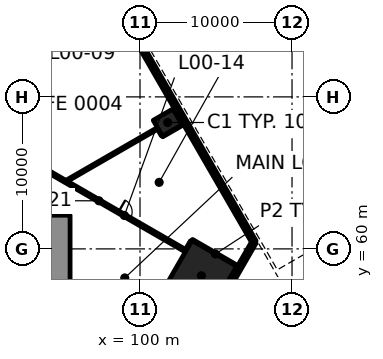
"""IFC4 building model, lengths in metres.
Left out: names, types, materials, properties, quantities, classifications, styles, units other than length and angle.
Written with IfcOpenShell. Run it as: python <this file> out.ifc"""

import sys

from ifc_helpers import new_model, si_unit, direction, frame, frame_2d, origin, origin_2d, place, context, subcontext, project, spatial, rectangle, extrude, element, fill, save


model = new_model("IFC4")
c1 = context("Model", 3, precision=1e-05, world=origin(), true_north=direction((0.0, 1.0)))
c2 = subcontext(c1, "Body", "Model", "MODEL_VIEW")
j1 = project(units=[si_unit("LENGTHUNIT", "METRE"), si_unit("PLANEANGLEUNIT", "RADIAN")], contexts=[c1])
p1 = place(None, origin())
s1 = spatial("IfcSite", under=j1, at=p1, CompositionType="ELEMENT")
p2 = place(p1, origin())
s2 = spatial("IfcBuilding", under=s1, at=p2, CompositionType="ELEMENT")
p3 = place(p2, origin())
s3 = spatial("IfcBuildingStorey", under=s2, at=p3, CompositionType="ELEMENT", Elevation=0.0)
p4 = place(p3, frame((94.2, 54.215, -0.3), z_axis=(0.0, 0.0, 1.0), x_axis=(0.0, 1.0, 0.0)))
e1 = element("IfcWall", 1, at=p4, inside=s3, PredefinedType="SHEAR", context=c2, shape_type="SweptSolid", body=[
    extrude(rectangle(XDim=8.0, YDim=2.4, at=frame_2d((4.0, 0.0))), origin(), (0.0, 0.0, 1.0), 8.3),
])
p5 = place(p3, frame((104.041, 58.233, 0.0), z_axis=(0.0, 0.0, 1.0), x_axis=(0.5, 0.866025403784, 0.0)))
e2 = element("IfcColumn", 2, at=p5, inside=s3, PredefinedType="COLUMN", context=c2, shape_type="SweptSolid", body=[
    extrude(rectangle(XDim=3.4, YDim=3.4, at=origin_2d()), origin(), (0.0, 0.0, 1.0), 8.0),
])
p6 = place(p3, frame((101.821, 68.315, 0.0), z_axis=(0.0, 0.0, 1.0), x_axis=(-0.5, 0.866025403784, 0.0)))
e3 = element("IfcColumn", 3, at=p6, inside=s3, PredefinedType="COLUMN", context=c2, shape_type="SweptSolid", body=[
    extrude(rectangle(XDim=1.2, YDim=1.5, at=origin_2d()), origin(), (0.0, 0.0, 1.0), 8.0),
])
p7 = place(p3, frame((101.471, 67.42, 0.0), z_axis=(0.0, 0.0, 1.0), x_axis=(0.866026058841, 0.499998865407, 0.0)))
e4 = element("IfcWall", 4, at=p7, inside=s3, PredefinedType="PARTITIONING", context=c2, shape_type="SweptSolid", body=[
    extrude(rectangle(XDim=1.708, YDim=0.1, at=frame_2d((0.854, 0.0))), origin(), (0.0, 0.0, 1.0), 7.1),
])
p8 = place(p3, frame((95.201, 64.493, 0.0), z_axis=(0.0, 0.0, 1.0), x_axis=(0.866031059472, 0.499990203933, 0.0)))
e5 = element("IfcWall", 5, at=p8, inside=s3, PredefinedType="PARTITIONING", context=c2, shape_type="SweptSolid", body=[
    extrude(rectangle(XDim=6.893, YDim=0.1, at=frame_2d((3.447, 0.0))), origin(), (0.0, 0.0, 1.0), 7.1),
])
p9 = place(p3, frame((103.062, 59.936, 0.0), z_axis=(0.0, 0.0, 1.0), x_axis=(0.500118698802, 0.865956862152, 0.0)))
e6 = element("IfcWall", 6, at=p9, inside=s3, PredefinedType="PARTITIONING", context=c2, shape_type="SweptSolid", body=[
    extrude(rectangle(XDim=0.64, YDim=0.15, at=frame_2d((0.32, 0.0))), origin(), (0.0, 0.0, 1.0), 7.1),
])
p10 = place(p3, frame((101.446, 67.464, 0.0), z_axis=(0.0, 0.0, 1.0), x_axis=(-0.500033033937, 0.866006330792, 0.0)))
e7 = element("IfcWall", 7, at=p10, inside=s3, PredefinedType="PARTITIONING", context=c2, shape_type="SweptSolid", body=[
    extrude(rectangle(XDim=0.499, YDim=0.1, at=frame_2d((0.25, 0.0))), origin(), (0.0, 0.0, 1.0), 7.1),
])
p11 = place(p3, frame((106.5, 58.776, 0.0), z_axis=(0.0, 0.0, 1.0), x_axis=(-0.866017611601, 0.500013496215, 0.0)))
e8 = element("IfcWall", 8, at=p11, inside=s3, PredefinedType="PARTITIONING", context=c2, shape_type="SweptSolid", body=[
    extrude(rectangle(XDim=3.558, YDim=0.15, at=frame_2d((1.779, 0.0))), origin(), (0.0, 0.0, 1.0), 7.1),
])
p12 = place(p3, frame((91.575, 66.47, 0.0), z_axis=(0.0, 0.0, 1.0), x_axis=(0.866027754727, -0.499995928025, 0.0)))
e9 = element("IfcWall", 9, at=p12, inside=s3, PredefinedType="PARTITIONING", context=c2, shape_type="SweptSolid", body=[
    extrude(rectangle(XDim=13.214, YDim=0.15, at=frame_2d((6.607, 0.0))), origin(), (0.0, 0.0, 1.0), 7.1),
])
p13 = place(p12, frame((8.091, 0.0, 0.0)))
e10 = element("IfcOpeningElement", 10, at=p13, cuts=e9, PredefinedType="OPENING", context=c2, shape_type="SweptSolid", body=[
    extrude(rectangle(XDim=0.9, YDim=2.1, at=frame_2d((0.45, 1.05))), frame((0.0, 0.085, 0.0), z_axis=(0.0, -1.0, 0.0), x_axis=(1.0, 0.0, 0.0)), (0.0, 0.0, 1.0), 0.17),
])
p14 = place(p3, frame((103.852, 54.125, 0.0), z_axis=(0.0, 0.0, 1.0), x_axis=(0.500000231294, 0.866025270247, 0.0)))
e11 = element("IfcWall", 11, at=p14, inside=s3, PredefinedType="SOLIDWALL", context=c2, shape_type="SweptSolid", body=[
    extrude(rectangle(XDim=7.304, YDim=0.3, at=frame_2d((3.652, 0.0))), origin(), (0.0, 0.0, 1.0), 7.7),
])
p15 = place(p14, frame((0.496, 0.0, 0.0)))
e12 = element("IfcOpeningElement", 12, at=p15, cuts=e11, PredefinedType="OPENING", context=c2, shape_type="SweptSolid", body=[
    extrude(rectangle(XDim=1.2, YDim=2.4, at=frame_2d((0.6, 1.2))), frame((0.0, 0.16, 0.0), z_axis=(0.0, -1.0, 0.0), x_axis=(1.0, 0.0, 0.0)), (0.0, 0.0, 1.0), 0.32),
])
p16 = place(p14, frame((3.852, 0.0, 0.15)))
e13 = element("IfcOpeningElement", 13, at=p16, cuts=e11, PredefinedType="OPENING", context=c2, shape_type="SweptSolid", body=[
    extrude(rectangle(XDim=2.1, YDim=5.4, at=frame_2d((1.05, 2.7))), frame((0.0, 0.16, 0.0), z_axis=(0.0, -1.0, 0.0), x_axis=(1.0, 0.0, 0.0)), (0.0, 0.0, 1.0), 0.32),
])
p17 = place(p3, frame((107.504, 60.451, 0.0), z_axis=(0.0, 0.0, 1.0), x_axis=(-0.500000550228, 0.86602508611, 0.0)))
e14 = element("IfcWall", 14, at=p17, inside=s3, PredefinedType="SOLIDWALL", context=c2, shape_type="SweptSolid", body=[
    extrude(rectangle(XDim=57.704, YDim=0.3, at=frame_2d((28.852, 0.0))), origin(), (0.0, 0.0, 1.0), 7.7),
])
p18 = place(p17, frame((56.104, 0.0, 0.0)))
e15 = element("IfcOpeningElement", 15, at=p18, cuts=e14, PredefinedType="OPENING", context=c2, shape_type="SweptSolid", body=[
    extrude(rectangle(XDim=1.2, YDim=2.4, at=frame_2d((0.6, 1.2))), frame((0.0, 0.16, 0.0), z_axis=(0.0, -1.0, 0.0), x_axis=(1.0, 0.0, 0.0)), (0.0, 0.0, 1.0), 0.32),
])
p19 = place(p17, frame((1.552, 0.0, 0.15)))
e16 = element("IfcOpeningElement", 16, at=p19, cuts=e14, PredefinedType="OPENING", context=c2, shape_type="SweptSolid", body=[
    extrude(rectangle(XDim=2.1, YDim=5.4, at=frame_2d((1.05, 2.7))), frame((0.0, 0.16, 0.0), z_axis=(0.0, -1.0, 0.0), x_axis=(1.0, 0.0, 0.0)), (0.0, 0.0, 1.0), 0.32),
])
p20 = place(p17, frame((4.052, 0.0, 0.15)))
e17 = element("IfcOpeningElement", 17, at=p20, cuts=e14, PredefinedType="OPENING", context=c2, shape_type="SweptSolid", body=[
    extrude(rectangle(XDim=2.1, YDim=5.4, at=frame_2d((1.05, 2.7))), frame((0.0, 0.16, 0.0), z_axis=(0.0, -1.0, 0.0), x_axis=(1.0, 0.0, 0.0)), (0.0, 0.0, 1.0), 0.32),
])
p21 = place(p17, frame((6.552, 0.0, 0.15)))
e18 = element("IfcOpeningElement", 18, at=p21, cuts=e14, PredefinedType="OPENING", context=c2, shape_type="SweptSolid", body=[
    extrude(rectangle(XDim=2.1, YDim=5.4, at=frame_2d((1.05, 2.7))), frame((0.0, 0.16, 0.0), z_axis=(0.0, -1.0, 0.0), x_axis=(1.0, 0.0, 0.0)), (0.0, 0.0, 1.0), 0.32),
])
p22 = place(p17, frame((9.052, 0.0, 0.15)))
e19 = element("IfcOpeningElement", 19, at=p22, cuts=e14, PredefinedType="OPENING", context=c2, shape_type="SweptSolid", body=[
    extrude(rectangle(XDim=2.1, YDim=5.4, at=frame_2d((1.05, 2.7))), frame((0.0, 0.16, 0.0), z_axis=(0.0, -1.0, 0.0), x_axis=(1.0, 0.0, 0.0)), (0.0, 0.0, 1.0), 0.32),
])
p23 = place(p17, frame((11.552, 0.0, 0.15)))
e20 = element("IfcOpeningElement", 20, at=p23, cuts=e14, PredefinedType="OPENING", context=c2, shape_type="SweptSolid", body=[
    extrude(rectangle(XDim=2.1, YDim=5.4, at=frame_2d((1.05, 2.7))), frame((0.0, 0.16, 0.0), z_axis=(0.0, -1.0, 0.0), x_axis=(1.0, 0.0, 0.0)), (0.0, 0.0, 1.0), 0.32),
])
p24 = place(p17, frame((14.052, 0.0, 0.15)))
e21 = element("IfcOpeningElement", 21, at=p24, cuts=e14, PredefinedType="OPENING", context=c2, shape_type="SweptSolid", body=[
    extrude(rectangle(XDim=2.1, YDim=5.4, at=frame_2d((1.05, 2.7))), frame((0.0, 0.16, 0.0), z_axis=(0.0, -1.0, 0.0), x_axis=(1.0, 0.0, 0.0)), (0.0, 0.0, 1.0), 0.32),
])
p25 = place(p17, frame((16.552, 0.0, 0.15)))
e22 = element("IfcOpeningElement", 22, at=p25, cuts=e14, PredefinedType="OPENING", context=c2, shape_type="SweptSolid", body=[
    extrude(rectangle(XDim=2.1, YDim=5.4, at=frame_2d((1.05, 2.7))), frame((0.0, 0.16, 0.0), z_axis=(0.0, -1.0, 0.0), x_axis=(1.0, 0.0, 0.0)), (0.0, 0.0, 1.0), 0.32),
])
p26 = place(p17, frame((19.052, 0.0, 0.15)))
e23 = element("IfcOpeningElement", 23, at=p26, cuts=e14, PredefinedType="OPENING", context=c2, shape_type="SweptSolid", body=[
    extrude(rectangle(XDim=2.1, YDim=5.4, at=frame_2d((1.05, 2.7))), frame((0.0, 0.16, 0.0), z_axis=(0.0, -1.0, 0.0), x_axis=(1.0, 0.0, 0.0)), (0.0, 0.0, 1.0), 0.32),
])
p27 = place(p17, frame((21.552, 0.0, 0.15)))
e24 = element("IfcOpeningElement", 24, at=p27, cuts=e14, PredefinedType="OPENING", context=c2, shape_type="SweptSolid", body=[
    extrude(rectangle(XDim=2.1, YDim=5.4, at=frame_2d((1.05, 2.7))), frame((0.0, 0.16, 0.0), z_axis=(0.0, -1.0, 0.0), x_axis=(1.0, 0.0, 0.0)), (0.0, 0.0, 1.0), 0.32),
])
p28 = place(p17, frame((24.052, 0.0, 0.15)))
e25 = element("IfcOpeningElement", 25, at=p28, cuts=e14, PredefinedType="OPENING", context=c2, shape_type="SweptSolid", body=[
    extrude(rectangle(XDim=2.1, YDim=5.4, at=frame_2d((1.05, 2.7))), frame((0.0, 0.16, 0.0), z_axis=(0.0, -1.0, 0.0), x_axis=(1.0, 0.0, 0.0)), (0.0, 0.0, 1.0), 0.32),
])
p29 = place(p17, frame((26.552, 0.0, 0.15)))
e26 = element("IfcOpeningElement", 26, at=p29, cuts=e14, PredefinedType="OPENING", context=c2, shape_type="SweptSolid", body=[
    extrude(rectangle(XDim=2.1, YDim=5.4, at=frame_2d((1.05, 2.7))), frame((0.0, 0.16, 0.0), z_axis=(0.0, -1.0, 0.0), x_axis=(1.0, 0.0, 0.0)), (0.0, 0.0, 1.0), 0.32),
])
p30 = place(p17, frame((29.052, 0.0, 0.15)))
e27 = element("IfcOpeningElement", 27, at=p30, cuts=e14, PredefinedType="OPENING", context=c2, shape_type="SweptSolid", body=[
    extrude(rectangle(XDim=2.1, YDim=5.4, at=frame_2d((1.05, 2.7))), frame((0.0, 0.16, 0.0), z_axis=(0.0, -1.0, 0.0), x_axis=(1.0, 0.0, 0.0)), (0.0, 0.0, 1.0), 0.32),
])
p31 = place(p17, frame((31.552, 0.0, 0.15)))
e28 = element("IfcOpeningElement", 28, at=p31, cuts=e14, PredefinedType="OPENING", context=c2, shape_type="SweptSolid", body=[
    extrude(rectangle(XDim=2.1, YDim=5.4, at=frame_2d((1.05, 2.7))), frame((0.0, 0.16, 0.0), z_axis=(0.0, -1.0, 0.0), x_axis=(1.0, 0.0, 0.0)), (0.0, 0.0, 1.0), 0.32),
])
p32 = place(p17, frame((34.052, 0.0, 0.15)))
e29 = element("IfcOpeningElement", 29, at=p32, cuts=e14, PredefinedType="OPENING", context=c2, shape_type="SweptSolid", body=[
    extrude(rectangle(XDim=2.1, YDim=5.4, at=frame_2d((1.05, 2.7))), frame((0.0, 0.16, 0.0), z_axis=(0.0, -1.0, 0.0), x_axis=(1.0, 0.0, 0.0)), (0.0, 0.0, 1.0), 0.32),
])
p33 = place(p17, frame((36.552, 0.0, 0.15)))
e30 = element("IfcOpeningElement", 30, at=p33, cuts=e14, PredefinedType="OPENING", context=c2, shape_type="SweptSolid", body=[
    extrude(rectangle(XDim=2.1, YDim=5.4, at=frame_2d((1.05, 2.7))), frame((0.0, 0.16, 0.0), z_axis=(0.0, -1.0, 0.0), x_axis=(1.0, 0.0, 0.0)), (0.0, 0.0, 1.0), 0.32),
])
p34 = place(p17, frame((39.052, 0.0, 0.15)))
e31 = element("IfcOpeningElement", 31, at=p34, cuts=e14, PredefinedType="OPENING", context=c2, shape_type="SweptSolid", body=[
    extrude(rectangle(XDim=2.1, YDim=5.4, at=frame_2d((1.05, 2.7))), frame((0.0, 0.16, 0.0), z_axis=(0.0, -1.0, 0.0), x_axis=(1.0, 0.0, 0.0)), (0.0, 0.0, 1.0), 0.32),
])
p35 = place(p17, frame((41.552, 0.0, 0.15)))
e32 = element("IfcOpeningElement", 32, at=p35, cuts=e14, PredefinedType="OPENING", context=c2, shape_type="SweptSolid", body=[
    extrude(rectangle(XDim=2.1, YDim=5.4, at=frame_2d((1.05, 2.7))), frame((0.0, 0.16, 0.0), z_axis=(0.0, -1.0, 0.0), x_axis=(1.0, 0.0, 0.0)), (0.0, 0.0, 1.0), 0.32),
])
p36 = place(p17, frame((44.052, 0.0, 0.15)))
e33 = element("IfcOpeningElement", 33, at=p36, cuts=e14, PredefinedType="OPENING", context=c2, shape_type="SweptSolid", body=[
    extrude(rectangle(XDim=2.1, YDim=5.4, at=frame_2d((1.05, 2.7))), frame((0.0, 0.16, 0.0), z_axis=(0.0, -1.0, 0.0), x_axis=(1.0, 0.0, 0.0)), (0.0, 0.0, 1.0), 0.32),
])
p37 = place(p17, frame((46.552, 0.0, 0.15)))
e34 = element("IfcOpeningElement", 34, at=p37, cuts=e14, PredefinedType="OPENING", context=c2, shape_type="SweptSolid", body=[
    extrude(rectangle(XDim=2.1, YDim=5.4, at=frame_2d((1.05, 2.7))), frame((0.0, 0.16, 0.0), z_axis=(0.0, -1.0, 0.0), x_axis=(1.0, 0.0, 0.0)), (0.0, 0.0, 1.0), 0.32),
])
p38 = place(p17, frame((49.052, 0.0, 0.15)))
e35 = element("IfcOpeningElement", 35, at=p38, cuts=e14, PredefinedType="OPENING", context=c2, shape_type="SweptSolid", body=[
    extrude(rectangle(XDim=2.1, YDim=5.4, at=frame_2d((1.05, 2.7))), frame((0.0, 0.16, 0.0), z_axis=(0.0, -1.0, 0.0), x_axis=(1.0, 0.0, 0.0)), (0.0, 0.0, 1.0), 0.32),
])
p39 = place(p17, frame((51.552, 0.0, 0.15)))
e36 = element("IfcOpeningElement", 36, at=p39, cuts=e14, PredefinedType="OPENING", context=c2, shape_type="SweptSolid", body=[
    extrude(rectangle(XDim=2.1, YDim=5.4, at=frame_2d((1.05, 2.7))), frame((0.0, 0.16, 0.0), z_axis=(0.0, -1.0, 0.0), x_axis=(1.0, 0.0, 0.0)), (0.0, 0.0, 1.0), 0.32),
])
p40 = place(p3, frame((107.106, 62.36, 0.0), z_axis=(0.0, 0.0, 1.0), x_axis=(-0.49999992739, 0.866025445706, 0.0)))
e37 = element("IfcWall", 37, at=p40, inside=s3, PredefinedType="SOLIDWALL", context=c2, shape_type="SweptSolid", body=[
    extrude(rectangle(XDim=54.0, YDim=0.4, at=frame_2d((27.0, 0.0))), origin(), (0.0, 0.0, 1.0), 7.64),
])
p41 = place(p3, frame((132.579, 77.24, 0.0), z_axis=(0.0, 0.0, 1.0), x_axis=(-0.866028651824, -0.499994374189, 0.0)))
e38 = element("IfcWall", 38, at=p41, inside=s3, PredefinedType="SOLIDWALL", context=c2, shape_type="SweptSolid", body=[
    extrude(rectangle(XDim=29.3, YDim=0.3, at=frame_2d((14.65, 0.0))), origin(), (0.0, 0.0, 1.0), 7.64),
])
p42 = place(p41, frame((15.7, 0.0, 0.0)))
e39 = element("IfcOpeningElement", 39, at=p42, cuts=e38, PredefinedType="OPENING", context=c2, shape_type="SweptSolid", body=[
    extrude(rectangle(XDim=2.0, YDim=2.4, at=frame_2d((1.0, 1.2))), frame((0.0, 0.16, 0.0), z_axis=(0.0, -1.0, 0.0), x_axis=(1.0, 0.0, 0.0)), (0.0, 0.0, 1.0), 0.32),
])
p43 = place(p41, frame((11.7, 0.0, 0.0)))
e40 = element("IfcOpeningElement", 40, at=p43, cuts=e38, PredefinedType="OPENING", context=c2, shape_type="SweptSolid", body=[
    extrude(rectangle(XDim=2.0, YDim=2.4, at=frame_2d((1.0, 1.2))), frame((0.0, 0.16, 0.0), z_axis=(0.0, -1.0, 0.0), x_axis=(1.0, 0.0, 0.0)), (0.0, 0.0, 1.0), 0.32),
])
p44 = place(p41, frame((27.225, 0.0, 0.0)))
e41 = element("IfcOpeningElement", 41, at=p44, cuts=e38, PredefinedType="OPENING", context=c2, shape_type="SweptSolid", body=[
    extrude(rectangle(XDim=1.2, YDim=2.2, at=frame_2d((0.6, 1.1))), frame((0.0, 0.16, 0.0), z_axis=(0.0, -1.0, 0.0), x_axis=(1.0, 0.0, 0.0)), (0.0, 0.0, 1.0), 0.32),
])
p45 = place(p41, frame((23.6, 0.0, 0.6)))
e42 = element("IfcOpeningElement", 42, at=p45, cuts=e38, PredefinedType="OPENING", context=c2, shape_type="SweptSolid", body=[
    extrude(rectangle(XDim=2.4, YDim=3.6, at=frame_2d((1.2, 1.8))), frame((0.0, 0.16, 0.0), z_axis=(0.0, -1.0, 0.0), x_axis=(1.0, 0.0, 0.0)), (0.0, 0.0, 1.0), 0.32),
])
p46 = place(p41, frame((3.5, 0.0, 0.6)))
e43 = element("IfcOpeningElement", 43, at=p46, cuts=e38, PredefinedType="OPENING", context=c2, shape_type="SweptSolid", body=[
    extrude(rectangle(XDim=2.4, YDim=3.6, at=frame_2d((1.2, 1.8))), frame((0.0, 0.16, 0.0), z_axis=(0.0, -1.0, 0.0), x_axis=(1.0, 0.0, 0.0)), (0.0, 0.0, 1.0), 0.32),
])
p47 = place(p3, frame((102.587, 70.587, 0.0), z_axis=(0.0, 0.0, 1.0), x_axis=(0.866039495442, 0.49997559174, 0.0)))
e44 = element("IfcWall", 44, at=p47, inside=s3, PredefinedType="SOLIDWALL", context=c2, shape_type="SweptSolid", body=[
    extrude(rectangle(XDim=2.95, YDim=0.25, at=frame_2d((1.475, 0.0))), origin(), (0.0, 0.0, 1.0), 7.64),
])
p48 = place(p3, frame((109.792, 64.257, 0.0), z_axis=(0.0, 0.0, 1.0), x_axis=(-0.499994616197, 0.866028512102, 0.0)))
e45 = element("IfcWall", 45, at=p48, inside=s3, PredefinedType="SOLIDWALL", context=c2, shape_type="SweptSolid", body=[
    extrude(rectangle(XDim=9.085, YDim=0.25, at=frame_2d((4.542, 0.0))), origin(), (0.0, 0.0, 1.0), 7.64),
])
p49 = place(p48, frame((0.2, 0.0, 0.0)))
e46 = element("IfcOpeningElement", 46, at=p49, cuts=e45, PredefinedType="OPENING", context=c2, shape_type="SweptSolid", body=[
    extrude(rectangle(XDim=1.0, YDim=2.1, at=frame_2d((0.5, 1.05))), frame((0.0, 0.135, 0.0), z_axis=(0.0, -1.0, 0.0), x_axis=(1.0, 0.0, 0.0)), (0.0, 0.0, 1.0), 0.27),
])
p50 = place(p3, frame((105.25, 72.125, 0.0), z_axis=(0.0, 0.0, 1.0), x_axis=(-0.499996309931, 0.866027534236, 0.0)))
e47 = element("IfcWall", 47, at=p50, inside=s3, PredefinedType="PARTITIONING", context=c2, shape_type="SweptSolid", body=[
    extrude(rectangle(XDim=12.09, YDim=0.2, at=frame_2d((6.045, 0.0))), origin(), (0.0, 0.0, 1.0), 7.64),
])
p51 = place(p50, frame((2.365, 0.0, 0.0)))
e48 = element("IfcOpeningElement", 48, at=p51, cuts=e47, PredefinedType="OPENING", context=c2, shape_type="SweptSolid", body=[
    extrude(rectangle(XDim=0.9, YDim=2.1, at=frame_2d((0.45, 1.05))), frame((0.0, 0.11, 0.0), z_axis=(0.0, -1.0, 0.0), x_axis=(1.0, 0.0, 0.0)), (0.0, 0.0, 1.0), 0.22),
])
p52 = place(p50, frame((8.365, 0.0, 0.0)))
e49 = element("IfcOpeningElement", 49, at=p52, cuts=e47, PredefinedType="OPENING", context=c2, shape_type="SweptSolid", body=[
    extrude(rectangle(XDim=0.9, YDim=2.1, at=frame_2d((0.45, 1.05))), frame((0.0, 0.11, 0.0), z_axis=(0.0, -1.0, 0.0), x_axis=(1.0, 0.0, 0.0)), (0.0, 0.0, 1.0), 0.22),
])
p53 = place(p3, frame((112.456, 65.794, 0.0), z_axis=(0.0, 0.0, 1.0), x_axis=(-0.499998559706, 0.866026235337, 0.0)))
e50 = element("IfcWall", 50, at=p53, inside=s3, PredefinedType="PARTITIONING", context=c2, shape_type="SweptSolid", body=[
    extrude(rectangle(XDim=53.4, YDim=0.2, at=frame_2d((26.7, 0.0))), origin(), (0.0, 0.0, 1.0), 7.64),
])
p54 = place(p53, frame((12.6, 0.0, 0.0)))
e51 = element("IfcOpeningElement", 51, at=p54, cuts=e50, PredefinedType="OPENING", context=c2, shape_type="SweptSolid", body=[
    extrude(rectangle(XDim=1.8, YDim=2.1, at=frame_2d((0.9, 1.05))), frame((0.0, 0.11, 0.0), z_axis=(0.0, -1.0, 0.0), x_axis=(1.0, 0.0, 0.0)), (0.0, 0.0, 1.0), 0.22),
])
p55 = place(p53, frame((25.8, 0.0, 0.0)))
e52 = element("IfcOpeningElement", 52, at=p55, cuts=e50, PredefinedType="OPENING", context=c2, shape_type="SweptSolid", body=[
    extrude(rectangle(XDim=1.8, YDim=2.1, at=frame_2d((0.9, 1.05))), frame((0.0, 0.11, 0.0), z_axis=(0.0, -1.0, 0.0), x_axis=(1.0, 0.0, 0.0)), (0.0, 0.0, 1.0), 0.22),
])
p56 = place(p53, frame((35.0, 0.0, 0.0)))
e53 = element("IfcOpeningElement", 53, at=p56, cuts=e50, PredefinedType="OPENING", context=c2, shape_type="SweptSolid", body=[
    extrude(rectangle(XDim=1.0, YDim=2.1, at=frame_2d((0.5, 1.05))), frame((0.0, 0.11, 0.0), z_axis=(0.0, -1.0, 0.0), x_axis=(1.0, 0.0, 0.0)), (0.0, 0.0, 1.0), 0.22),
])
p57 = place(p53, frame((45.75, 0.0, 0.0)))
e54 = element("IfcOpeningElement", 54, at=p57, cuts=e50, PredefinedType="OPENING", context=c2, shape_type="SweptSolid", body=[
    extrude(rectangle(XDim=1.8, YDim=2.1, at=frame_2d((0.9, 1.05))), frame((0.0, 0.11, 0.0), z_axis=(0.0, -1.0, 0.0), x_axis=(1.0, 0.0, 0.0)), (0.0, 0.0, 1.0), 0.22),
])
p58 = place(p13, origin())
e55 = element("IfcDoor", 55, at=p58, inside=s3, OperationType="SINGLE_SWING_LEFT", PredefinedType="DOOR", context=c2, shape_type="SweptSolid", body=[
    extrude(rectangle(XDim=0.9, YDim=2.1, at=frame_2d((0.45, 1.05))), frame((0.0, 0.025, 0.0), z_axis=(0.0, -1.0, 0.0), x_axis=(1.0, 0.0, 0.0)), (0.0, 0.0, 1.0), 0.05),
])
fill(e10, e55)
p59 = place(p16, origin())
e56 = element("IfcWindow", 56, at=p59, inside=s3, PartitioningType="SINGLE_PANEL", PredefinedType="WINDOW", context=c2, shape_type="SweptSolid", body=[
    extrude(rectangle(XDim=2.1, YDim=5.4, at=frame_2d((1.05, 2.7))), frame((0.0, 0.03, 0.0), z_axis=(0.0, -1.0, 0.0), x_axis=(1.0, 0.0, 0.0)), (0.0, 0.0, 1.0), 0.06),
])
fill(e13, e56)
p60 = place(p19, origin())
e57 = element("IfcWindow", 57, at=p60, inside=s3, PartitioningType="SINGLE_PANEL", PredefinedType="WINDOW", context=c2, shape_type="SweptSolid", body=[
    extrude(rectangle(XDim=2.1, YDim=5.4, at=frame_2d((1.05, 2.7))), frame((0.0, 0.03, 0.0), z_axis=(0.0, -1.0, 0.0), x_axis=(1.0, 0.0, 0.0)), (0.0, 0.0, 1.0), 0.06),
])
fill(e16, e57)
p61 = place(p20, origin())
e58 = element("IfcWindow", 58, at=p61, inside=s3, PartitioningType="SINGLE_PANEL", PredefinedType="WINDOW", context=c2, shape_type="SweptSolid", body=[
    extrude(rectangle(XDim=2.1, YDim=5.4, at=frame_2d((1.05, 2.7))), frame((0.0, 0.03, 0.0), z_axis=(0.0, -1.0, 0.0), x_axis=(1.0, 0.0, 0.0)), (0.0, 0.0, 1.0), 0.06),
])
fill(e17, e58)
p62 = place(p21, origin())
e59 = element("IfcWindow", 59, at=p62, inside=s3, PartitioningType="SINGLE_PANEL", PredefinedType="WINDOW", context=c2, shape_type="SweptSolid", body=[
    extrude(rectangle(XDim=2.1, YDim=5.4, at=frame_2d((1.05, 2.7))), frame((0.0, 0.03, 0.0), z_axis=(0.0, -1.0, 0.0), x_axis=(1.0, 0.0, 0.0)), (0.0, 0.0, 1.0), 0.06),
])
fill(e18, e59)
p63 = place(p22, origin())
e60 = element("IfcWindow", 60, at=p63, inside=s3, PartitioningType="SINGLE_PANEL", PredefinedType="WINDOW", context=c2, shape_type="SweptSolid", body=[
    extrude(rectangle(XDim=2.1, YDim=5.4, at=frame_2d((1.05, 2.7))), frame((0.0, 0.03, 0.0), z_axis=(0.0, -1.0, 0.0), x_axis=(1.0, 0.0, 0.0)), (0.0, 0.0, 1.0), 0.06),
])
fill(e19, e60)
p64 = place(p23, origin())
e61 = element("IfcWindow", 61, at=p64, inside=s3, PartitioningType="SINGLE_PANEL", PredefinedType="WINDOW", context=c2, shape_type="SweptSolid", body=[
    extrude(rectangle(XDim=2.1, YDim=5.4, at=frame_2d((1.05, 2.7))), frame((0.0, 0.03, 0.0), z_axis=(0.0, -1.0, 0.0), x_axis=(1.0, 0.0, 0.0)), (0.0, 0.0, 1.0), 0.06),
])
fill(e20, e61)
p65 = place(p24, origin())
e62 = element("IfcWindow", 62, at=p65, inside=s3, PartitioningType="SINGLE_PANEL", PredefinedType="WINDOW", context=c2, shape_type="SweptSolid", body=[
    extrude(rectangle(XDim=2.1, YDim=5.4, at=frame_2d((1.05, 2.7))), frame((0.0, 0.03, 0.0), z_axis=(0.0, -1.0, 0.0), x_axis=(1.0, 0.0, 0.0)), (0.0, 0.0, 1.0), 0.06),
])
fill(e21, e62)
p66 = place(p44, origin())
e63 = element("IfcDoor", 63, at=p66, inside=s3, OperationType="SINGLE_SWING_LEFT", PredefinedType="DOOR", context=c2, shape_type="SweptSolid", body=[
    extrude(rectangle(XDim=1.2, YDim=2.2, at=frame_2d((0.6, 1.1))), frame((0.0, 0.025, 0.0), z_axis=(0.0, -1.0, 0.0), x_axis=(1.0, 0.0, 0.0)), (0.0, 0.0, 1.0), 0.05),
])
fill(e41, e63)
p67 = place(p45, origin())
e64 = element("IfcWindow", 64, at=p67, inside=s3, PartitioningType="SINGLE_PANEL", PredefinedType="WINDOW", context=c2, shape_type="SweptSolid", body=[
    extrude(rectangle(XDim=2.4, YDim=3.6, at=frame_2d((1.2, 1.8))), frame((0.0, 0.03, 0.0), z_axis=(0.0, -1.0, 0.0), x_axis=(1.0, 0.0, 0.0)), (0.0, 0.0, 1.0), 0.06),
])
fill(e42, e64)
p68 = place(p49, origin())
e65 = element("IfcDoor", 65, at=p68, inside=s3, OperationType="SINGLE_SWING_LEFT", PredefinedType="DOOR", context=c2, shape_type="SweptSolid", body=[
    extrude(rectangle(XDim=1.0, YDim=2.1, at=frame_2d((0.5, 1.05))), frame((0.0, 0.025, 0.0), z_axis=(0.0, -1.0, 0.0), x_axis=(1.0, 0.0, 0.0)), (0.0, 0.0, 1.0), 0.05),
])
fill(e46, e65)
save(model, sys.argv[1])
